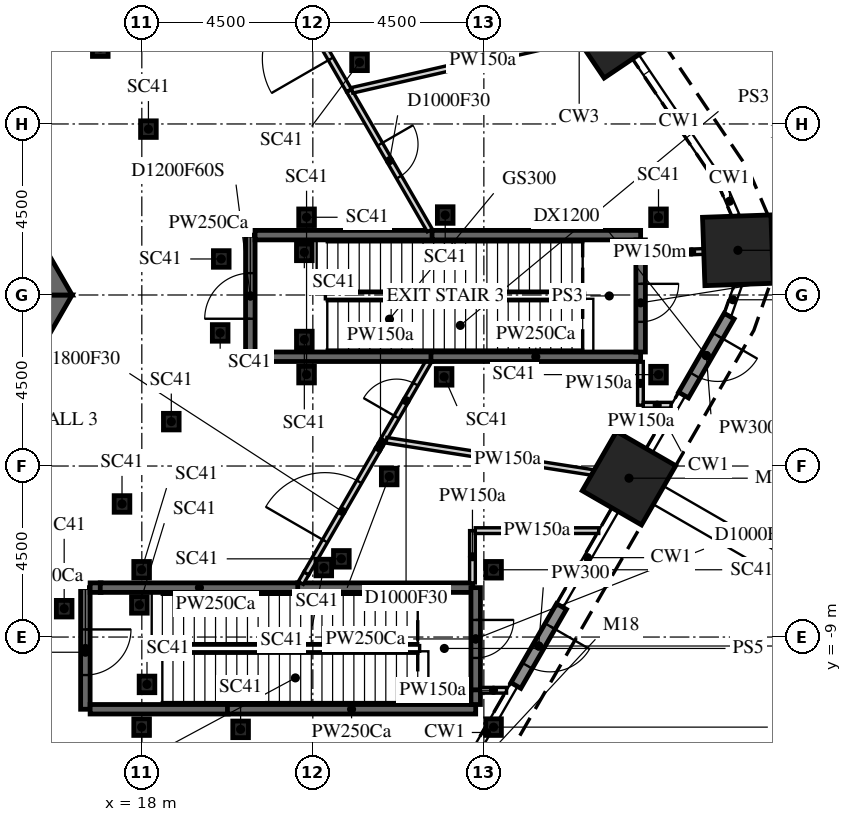
"""IFC4 building model, lengths in metres.
Left out: names, types, materials, properties, quantities, classifications, styles, units other than length and angle.
Written with IfcOpenShell. Run it as: python <this file> out.ifc"""

import sys

from ifc_helpers import new_model, si_unit, direction, frame, frame_2d, origin, origin_2d, place, context, subcontext, project, spatial, polyline, rectangle, i_section, outline, extrude, element, fill, save


model = new_model("IFC4")
c1 = context("Model", 3, precision=1e-05, world=origin(), true_north=direction((0.0, 1.0)))
c2 = subcontext(c1, "Body", "Model", "MODEL_VIEW")
j1 = project(units=[si_unit("LENGTHUNIT", "METRE"), si_unit("PLANEANGLEUNIT", "RADIAN")], contexts=[c1])
p1 = place(None, origin())
s1 = spatial("IfcSite", under=j1, at=p1, CompositionType="ELEMENT")
p2 = place(p1, origin())
s2 = spatial("IfcBuilding", under=s1, at=p2, CompositionType="ELEMENT")
p3 = place(p2, origin())
s3 = spatial("IfcBuildingStorey", under=s2, at=p3, CompositionType="ELEMENT", Elevation=0.0)
for number, where, z_axis, x_axis in (
    (1, (30.819, -4.82, -2.1), (0.0, 0.0, 1.0), (-0.5, -0.866, 0.0)),
    (2, (33.685, 1.176, -2.1), (0.0, 0.0, 1.0), (0.035, -0.999, 0.0)),
    (3, (30.407, 6.958, -2.1), (0.0, 0.0, 1.0), (0.559, -0.829, 0.0)),
):
    element("IfcColumn", number, at=place(p3, frame(where, z_axis=z_axis, x_axis=x_axis)), inside=s3, PredefinedType="COLUMN", context=c2, shape_type="SweptSolid", body=[
        extrude(rectangle(XDim=1.8, YDim=1.8, at=origin_2d()), origin(), (0.0, 0.0, 1.0), 10.85),
    ])
for number, where, z_axis, x_axis in (
    (4, (22.276, 1.121, -2.1), (0.0, 0.0, 1.0), (1.0, 0.0, 0.0)),
    (5, (20.091, 0.948, -2.1), (0.0, 0.0, 1.0), (1.0, 0.0, 0.0)),
    (6, (18.174, 4.364, -2.1), (0.0, 0.0, 1.0), (1.0, 0.0, 0.0)),
    (7, (23.728, 6.122, -2.1), (0.0, 0.0, 1.0), (1.0, 0.0, 0.0)),
    (8, (25.983, 2.104, -2.1), (0.0, 0.0, 1.0), (1.0, 0.0, 0.0)),
    (9, (31.595, 2.045, -2.1), (0.0, 0.0, 1.0), (1.0, 0.0, 0.0)),
    (10, (31.595, -2.095, -2.1), (0.0, 0.0, 1.0), (1.0, 0.0, 0.0)),
    (11, (25.954, -2.154, -2.1), (0.0, 0.0, 1.0), (1.0, 0.0, 0.0)),
    (12, (24.509, -4.776, -2.1), (0.0, 0.0, 1.0), (1.0, 0.0, 0.0)),
    (13, (18.776, -3.332, -2.1), (0.0, 0.0, 1.0), (1.0, 0.0, 0.0)),
    (14, (20.062, -0.998, -2.1), (0.0, 0.0, 1.0), (1.0, 0.0, 0.0)),
    (15, (22.276, -1.171, -2.1), (0.0, 0.0, 1.0), (1.0, 0.0, 0.0)),
    (16, (15.957, -8.254, -2.1), (0.0, 0.0, 1.0), (1.0, 0.0, 0.0)),
    (17, (17.479, -5.498, -2.1), (0.0, 0.0, 1.0), (1.0, 0.0, 0.0)),
    (18, (23.25, -6.942, -2.1), (0.0, 0.0, 1.0), (1.0, 0.0, 0.0)),
    (19, (22.788, -7.171, -2.1), (0.0, 0.0, 1.0), (1.0, 0.0, 0.0)),
    (20, (27.255, -7.23, -2.1), (0.0, 0.0, 1.0), (1.0, 0.0, 0.0)),
    (21, (27.255, -11.37, -2.1), (0.0, 0.0, 1.0), (1.0, 0.0, 0.0)),
    (22, (20.599, -11.429, -2.1), (0.0, 0.0, 1.0), (1.0, 0.0, 0.0)),
    (23, (18.136, -10.246, -2.1), (0.0, 0.0, 1.0), (1.0, 0.0, 0.0)),
    (24, (17.936, -8.154, -2.1), (0.0, 0.0, 1.0), (1.0, 0.0, 0.0)),
    (25, (16.907, 6.496, -2.1), (0.0, 0.0, 1.0), (1.0, 0.0, 0.0)),
    (26, (22.335, -2.095, -2.1), (0.0, 0.0, 1.0), (1.0, 0.0, 0.0)),
    (27, (22.335, 2.045, -2.1), (0.0, 0.0, 1.0), (1.0, 0.0, 0.0)),
    (28, (17.995, -11.37, -2.1), (0.0, 0.0, 1.0), (1.0, 0.0, 0.0)),
    (29, (17.995, -7.23, -2.1), (0.0, 0.0, 1.0), (1.0, 0.0, 0.0)),
):
    element("IfcColumn", number, at=place(p3, frame(where, z_axis=z_axis, x_axis=x_axis)), inside=s3, PredefinedType="COLUMN", context=c2, shape_type="SweptSolid", body=[
        extrude(i_section(OverallWidth=0.412, OverallDepth=0.437, WebThickness=0.036, FlangeThickness=0.058, FilletRadius=0.015, at=origin_2d()), origin(), (0.0, 0.0, 1.0), 10.85),
    ])
p4 = place(p3, frame((29.043, -8.197, 0.0), z_axis=(0.0, 0.0, 1.0), x_axis=(-0.500001309137, -0.866024647952, 0.0)))
e30 = element("IfcWall", 30, at=p4, inside=s3, PredefinedType="SOLIDWALL", context=c2, shape_type="SweptSolid", body=[
    extrude(rectangle(XDim=2.4, YDim=0.3, at=frame_2d((1.2, 0.0))), origin(), (0.0, 0.0, 1.0), 7.823),
])
p5 = place(p4, frame((0.6, 0.0, 0.0)))
e31 = element("IfcOpeningElement", 31, at=p5, cuts=e30, PredefinedType="OPENING", context=c2, shape_type="SweptSolid", body=[
    extrude(rectangle(XDim=1.2, YDim=2.1, at=frame_2d((0.6, 1.05))), frame((0.0, 0.16, 0.0), z_axis=(0.0, -1.0, 0.0), x_axis=(1.0, 0.0, 0.0)), (0.0, 0.0, 1.0), 0.32),
])
p6 = place(p3, frame((33.455, -0.555, 0.0), z_axis=(0.0, 0.0, 1.0), x_axis=(-0.499957262057, -0.866050077142, 0.0)))
e32 = element("IfcWall", 32, at=p6, inside=s3, PredefinedType="SOLIDWALL", context=c2, shape_type="SweptSolid", body=[
    extrude(rectangle(XDim=2.4, YDim=0.3, at=frame_2d((1.2, 0.0))), origin(), (0.0, 0.0, 1.0), 7.823),
])
p7 = place(p6, frame((0.6, 0.0, 0.0)))
e33 = element("IfcOpeningElement", 33, at=p7, cuts=e32, PredefinedType="OPENING", context=c2, shape_type="SweptSolid", body=[
    extrude(rectangle(XDim=1.2, YDim=2.1, at=frame_2d((0.6, 1.05))), frame((0.0, 0.16, 0.0), z_axis=(0.0, -1.0, 0.0), x_axis=(1.0, 0.0, 0.0)), (0.0, 0.0, 1.0), 0.32),
])
p8 = place(p3, frame((7.91, -13.7, -2.1), z_axis=(0.0, 0.0, 1.0), x_axis=(0.499999880136, 0.866025472988, 0.0)))
e34 = element("IfcWall", 34, at=p8, inside=s3, PredefinedType="SHEAR", context=c2, shape_type="SweptSolid", body=[
    extrude(outline(polyline([(-0.173, -0.3), (15.993, -0.3), (15.646, 0.3), (0.173, 0.3), (-0.173, -0.3)])), origin(), (0.0, 0.0, 1.0), 10.85),
])
p9 = place(p8, frame((7.039, 0.0, 2.1)))
e35 = element("IfcOpeningElement", 35, at=p9, cuts=e34, PredefinedType="OPENING", context=c2, shape_type="SweptSolid", body=[
    extrude(rectangle(XDim=1.8, YDim=2.4, at=frame_2d((0.9, 1.2))), frame((0.0, 0.31, 0.0), z_axis=(0.0, -1.0, 0.0), x_axis=(1.0, 0.0, 0.0)), (0.0, 0.0, 1.0), 0.62),
])
p10 = place(p3, frame((15.819, 0.0, -2.1), z_axis=(0.0, 0.0, 1.0), x_axis=(-0.499999880136, 0.866025472988, 0.0)))
e36 = element("IfcWall", 36, at=p10, inside=s3, PredefinedType="SHEAR", context=c2, shape_type="SweptSolid", body=[
    extrude(outline(polyline([(-0.173, -0.3), (15.993, -0.3), (15.646, 0.3), (0.173, 0.3), (-0.173, -0.3)])), origin(), (0.0, 0.0, 1.0), 10.85),
])
p11 = place(p10, frame((6.981, 0.0, 2.1)))
e37 = element("IfcOpeningElement", 37, at=p11, cuts=e36, PredefinedType="OPENING", context=c2, shape_type="SweptSolid", body=[
    extrude(rectangle(XDim=1.8, YDim=2.4, at=frame_2d((0.9, 1.2))), frame((0.0, 0.31, 0.0), z_axis=(0.0, -1.0, 0.0), x_axis=(1.0, 0.0, 0.0)), (0.0, 0.0, 1.0), 0.62),
])
p12 = place(p3, frame((16.515, -7.7, 0.0), z_axis=(0.0, 0.0, 1.0), x_axis=(0.0, -1.0, 0.0)))
e38 = element("IfcWall", 38, at=p12, inside=s3, PredefinedType="PARTITIONING", context=c2, shape_type="SweptSolid", body=[
    extrude(rectangle(XDim=3.2, YDim=0.25, at=frame_2d((1.6, 0.0))), origin(), (0.0, 0.0, 1.0), 8.75),
])
p13 = place(p12, frame((1.1, 0.0, 0.0)))
e39 = element("IfcOpeningElement", 39, at=p13, cuts=e38, PredefinedType="OPENING", context=c2, shape_type="SweptSolid", body=[
    extrude(rectangle(XDim=1.2, YDim=2.1, at=frame_2d((0.6, 1.05))), frame((0.0, 0.135, 0.0), z_axis=(0.0, -1.0, 0.0), x_axis=(1.0, 0.0, 0.0)), (0.0, 0.0, 1.0), 0.27),
])
p14 = place(p3, frame((16.64, -7.7, 0.0), z_axis=(0.0, 0.0, 1.0), x_axis=(1.0, 0.0, 0.0)))
e40 = element("IfcWall", 40, at=p14, inside=s3, PredefinedType="PARTITIONING", context=c2, shape_type="SweptSolid", body=[
    extrude(rectangle(XDim=0.288, YDim=0.25, at=frame_2d((0.144, 0.0))), origin(), (0.0, 0.0, 1.0), 8.75),
])
p15 = place(p3, frame((16.906, -7.7, 0.0), z_axis=(0.0, 0.0, 1.0), x_axis=(1.0, 0.0, 0.0)))
e41 = element("IfcWall", 41, at=p15, inside=s3, PredefinedType="PARTITIONING", context=c2, shape_type="SweptSolid", body=[
    extrude(rectangle(XDim=5.219, YDim=0.25, at=frame_2d((2.609, 0.0))), origin(), (0.0, 0.0, 1.0), 8.75),
])
p16 = place(p3, frame((20.275, -10.9, 0.0), z_axis=(0.0, 0.0, 1.0), x_axis=(-1.0, 0.0, 0.0)))
e42 = element("IfcWall", 42, at=p16, inside=s3, PredefinedType="PARTITIONING", context=c2, shape_type="SweptSolid", body=[
    extrude(rectangle(XDim=3.635, YDim=0.25, at=frame_2d((1.817, 0.0))), origin(), (0.0, 0.0, 1.0), 8.75),
])
p17 = place(p3, frame((20.855, -1.625, 0.0), z_axis=(0.0, 0.0, 1.0), x_axis=(0.0, 1.0, 0.0)))
e43 = element("IfcWall", 43, at=p17, inside=s3, PredefinedType="PARTITIONING", context=c2, shape_type="SweptSolid", body=[
    extrude(rectangle(XDim=3.2, YDim=0.25, at=frame_2d((1.6, 0.0))), origin(), (0.0, 0.0, 1.0), 8.75),
])
p18 = place(p17, frame((1.0, 0.0, 0.0)))
e44 = element("IfcOpeningElement", 44, at=p18, cuts=e43, PredefinedType="OPENING", context=c2, shape_type="SweptSolid", body=[
    extrude(rectangle(XDim=1.2, YDim=2.1, at=frame_2d((0.6, 1.05))), frame((0.0, 0.135, 0.0), z_axis=(0.0, -1.0, 0.0), x_axis=(1.0, 0.0, 0.0)), (0.0, 0.0, 1.0), 0.27),
])
p19 = place(p3, frame((20.98, 1.575, 0.0), z_axis=(0.0, 0.0, 1.0), x_axis=(1.0, 0.0, 0.0)))
e45 = element("IfcWall", 45, at=p19, inside=s3, PredefinedType="PARTITIONING", context=c2, shape_type="SweptSolid", body=[
    extrude(rectangle(XDim=4.679, YDim=0.25, at=frame_2d((2.339, 0.0))), origin(), (0.0, 0.0, 1.0), 8.75),
])
p20 = place(p3, frame((22.102, -7.7, 0.0), z_axis=(0.0, 0.0, 1.0), x_axis=(1.0, 0.0, 0.0)))
e46 = element("IfcWall", 46, at=p20, inside=s3, PredefinedType="PARTITIONING", context=c2, shape_type="SweptSolid", body=[
    extrude(rectangle(XDim=4.608, YDim=0.25, at=frame_2d((2.304, 0.0))), origin(), (0.0, 0.0, 1.0), 8.75),
])
p21 = place(p3, frame((22.184, -7.575, 0.0), z_axis=(0.0, 0.0, 1.0), x_axis=(0.500158362642, 0.865933953763, 0.0)))
e47 = element("IfcWall", 47, at=p21, inside=s3, PredefinedType="PARTITIONING", context=c2, shape_type="SweptSolid", body=[
    extrude(rectangle(XDim=0.307, YDim=0.15, at=frame_2d((0.154, 0.0))), origin(), (0.0, 0.0, 1.0), 8.75),
])
p22 = place(p3, frame((22.328, -7.326, 0.0), z_axis=(0.0, 0.0, 1.0), x_axis=(0.499922466183, 0.866070163327, 0.0)))
e48 = element("IfcWall", 48, at=p22, inside=s3, PredefinedType="PARTITIONING", context=c2, shape_type="SweptSolid", body=[
    extrude(rectangle(XDim=3.769, YDim=0.15, at=frame_2d((1.884, 0.0))), origin(), (0.0, 0.0, 1.0), 8.75),
])
p23 = place(p22, frame((0.984, 0.0, 0.0)))
e49 = element("IfcOpeningElement", 49, at=p23, cuts=e48, PredefinedType="OPENING", context=c2, shape_type="SweptSolid", body=[
    extrude(rectangle(XDim=1.8, YDim=2.1, at=frame_2d((0.9, 1.05))), frame((0.0, 0.085, 0.0), z_axis=(0.0, -1.0, 0.0), x_axis=(1.0, 0.0, 0.0)), (0.0, 0.0, 1.0), 0.17),
])
p24 = place(p3, frame((23.449, 5.386, 0.0), z_axis=(0.0, 0.0, 1.0), x_axis=(-0.500058396869, 0.865991685711, 0.0)))
e50 = element("IfcWall", 50, at=p24, inside=s3, PredefinedType="PARTITIONING", context=c2, shape_type="SweptSolid", body=[
    extrude(rectangle(XDim=3.711, YDim=0.15, at=frame_2d((1.856, 0.0))), origin(), (0.0, 0.0, 1.0), 8.75),
])
p25 = place(p24, frame((0.956, 0.0, 0.0)))
e51 = element("IfcOpeningElement", 51, at=p25, cuts=e50, PredefinedType="OPENING", context=c2, shape_type="SweptSolid", body=[
    extrude(rectangle(XDim=1.8, YDim=2.1, at=frame_2d((0.9, 1.05))), frame((0.0, 0.085, 0.0), z_axis=(0.0, -1.0, 0.0), x_axis=(1.0, 0.0, 0.0)), (0.0, 0.0, 1.0), 0.17),
])
p26 = place(p3, frame((24.202, -4.079, 0.0), z_axis=(0.0, 0.0, 1.0), x_axis=(0.501624101268, 0.865085695771, 0.0)))
e52 = element("IfcWall", 52, at=p26, inside=s3, PredefinedType="PARTITIONING", context=c2, shape_type="SweptSolid", body=[
    extrude(rectangle(XDim=0.311, YDim=0.15, at=frame_2d((0.156, 0.0))), origin(), (0.0, 0.0, 1.0), 8.75),
])
p27 = place(p3, frame((24.358, -3.81, 0.0), z_axis=(0.0, 0.0, 1.0), x_axis=(0.500178430292, 0.865922362496, 0.0)))
e53 = element("IfcWall", 53, at=p27, inside=s3, PredefinedType="PARTITIONING", context=c2, shape_type="SweptSolid", body=[
    extrude(rectangle(XDim=2.379, YDim=0.15, at=frame_2d((1.189, 0.0))), origin(), (0.0, 0.0, 1.0), 8.75),
])
p28 = place(p27, frame((0.689, 0.0, 0.0)))
e54 = element("IfcOpeningElement", 54, at=p28, cuts=e53, PredefinedType="OPENING", context=c2, shape_type="SweptSolid", body=[
    extrude(rectangle(XDim=1.0, YDim=2.1, at=frame_2d((0.5, 1.05))), frame((0.0, 0.085, 0.0), z_axis=(0.0, -1.0, 0.0), x_axis=(1.0, 0.0, 0.0)), (0.0, 0.0, 1.0), 0.17),
])
p29 = place(p3, frame((25.63, -1.625, 0.0), z_axis=(0.0, 0.0, 1.0), x_axis=(-1.0, 0.0, 0.0)))
e55 = element("IfcWall", 55, at=p29, inside=s3, PredefinedType="PARTITIONING", context=c2, shape_type="SweptSolid", body=[
    extrude(rectangle(XDim=4.65, YDim=0.25, at=frame_2d((2.325, 0.0))), origin(), (0.0, 0.0, 1.0), 8.75),
])
p30 = place(p3, frame((25.637, 1.575, 0.0), z_axis=(0.0, 0.0, 1.0), x_axis=(1.0, 0.0, 0.0)))
e56 = element("IfcWall", 56, at=p30, inside=s3, PredefinedType="PARTITIONING", context=c2, shape_type="SweptSolid", body=[
    extrude(rectangle(XDim=5.488, YDim=0.25, at=frame_2d((2.744, 0.0))), origin(), (0.0, 0.0, 1.0), 8.75),
])
p31 = place(p3, frame((23.459, 5.368, 0.0), z_axis=(0.0, 0.0, 1.0), x_axis=(0.500038455881, -0.866003200133, 0.0)))
e57 = element("IfcWall", 57, at=p31, inside=s3, PredefinedType="PARTITIONING", context=c2, shape_type="SweptSolid", body=[
    extrude(rectangle(XDim=4.236, YDim=0.15, at=frame_2d((2.118, 0.0))), origin(), (0.0, 0.0, 1.0), 8.75),
])
p32 = place(p31, frame((1.618, 0.0, 0.0)))
e58 = element("IfcOpeningElement", 58, at=p32, cuts=e57, PredefinedType="OPENING", context=c2, shape_type="SweptSolid", body=[
    extrude(rectangle(XDim=1.0, YDim=2.1, at=frame_2d((0.5, 1.05))), frame((0.0, 0.085, 0.0), z_axis=(0.0, -1.0, 0.0), x_axis=(1.0, 0.0, 0.0)), (0.0, 0.0, 1.0), 0.17),
])
p33 = place(p3, frame((26.7, -7.575, 0.0), z_axis=(0.0, 0.0, 1.0), x_axis=(0.0, 1.0, 0.0)))
e59 = element("IfcWall", 59, at=p33, inside=s3, PredefinedType="PARTITIONING", context=c2, shape_type="SweptSolid", body=[
    extrude(rectangle(XDim=1.375, YDim=0.15, at=frame_2d((0.688, 0.0))), origin(), (0.0, 0.0, 1.0), 8.75),
])
p34 = place(p3, frame((26.775, -6.2, 0.0), z_axis=(0.0, 0.0, 1.0), x_axis=(1.0, 0.0, 0.0)))
e60 = element("IfcWall", 60, at=p34, inside=s3, PredefinedType="PARTITIONING", context=c2, shape_type="SweptSolid", body=[
    extrude(rectangle(XDim=3.247, YDim=0.15, at=frame_2d((1.624, 0.0))), origin(), (0.0, 0.0, 1.0), 8.75),
])
p35 = place(p3, frame((26.785, -10.9, 0.0), z_axis=(0.0, 0.0, 1.0), x_axis=(-1.0, 0.0, 0.0)))
e61 = element("IfcWall", 61, at=p35, inside=s3, PredefinedType="PARTITIONING", context=c2, shape_type="SweptSolid", body=[
    extrude(rectangle(XDim=6.532, YDim=0.25, at=frame_2d((3.266, 0.0))), origin(), (0.0, 0.0, 1.0), 8.75),
])
p36 = place(p3, frame((26.785, -7.7, 0.0), z_axis=(0.0, 0.0, 1.0), x_axis=(0.0, -1.0, 0.0)))
e62 = element("IfcWall", 62, at=p36, inside=s3, PredefinedType="PARTITIONING", context=c2, shape_type="SweptSolid", body=[
    extrude(rectangle(XDim=2.7, YDim=0.25, at=frame_2d((1.35, 0.0))), origin(), (0.0, 0.0, 1.0), 8.75),
])
p37 = place(p36, frame((0.85, 0.0, 0.0)))
e63 = element("IfcOpeningElement", 63, at=p37, cuts=e62, PredefinedType="OPENING", context=c2, shape_type="SweptSolid", body=[
    extrude(rectangle(XDim=1.0, YDim=2.1, at=frame_2d((0.5, 1.05))), frame((0.0, 0.135, 0.0), z_axis=(0.0, -1.0, 0.0), x_axis=(1.0, 0.0, 0.0)), (0.0, 0.0, 1.0), 0.27),
])
p38 = place(p3, frame((26.785, -10.39, 0.0), z_axis=(0.0, 0.0, 1.0), x_axis=(0.0, -1.0, 0.0)))
e64 = element("IfcWall", 64, at=p38, inside=s3, PredefinedType="PARTITIONING", context=c2, shape_type="SweptSolid", body=[
    extrude(rectangle(XDim=0.385, YDim=0.25, at=frame_2d((0.192, 0.0))), origin(), (0.0, 0.0, 1.0), 8.75),
])
p39 = place(p3, frame((27.597, -10.4, 0.0), z_axis=(0.0, 0.0, 1.0), x_axis=(-1.0, 0.0, 0.0)))
e65 = element("IfcWall", 65, at=p39, inside=s3, PredefinedType="PARTITIONING", context=c2, shape_type="SweptSolid", body=[
    extrude(rectangle(XDim=0.687, YDim=0.15, at=frame_2d((0.344, 0.0))), origin(), (0.0, 0.0, 1.0), 8.75),
])
p40 = place(p3, frame((30.407, 6.958, 0.0), z_axis=(0.0, 0.0, 1.0), x_axis=(-0.974801082726, -0.223075881967, 0.0)))
e66 = element("IfcWall", 66, at=p40, inside=s3, PredefinedType="PARTITIONING", context=c2, shape_type="SweptSolid", body=[
    extrude(rectangle(XDim=7.049, YDim=0.15, at=frame_2d((3.525, 0.0))), origin(), (0.0, 0.0, 1.0), 8.75),
])
p41 = place(p3, frame((30.819, -4.82, 0.0), z_axis=(0.0, 0.0, 1.0), x_axis=(-0.988001762329, 0.154442603041, 0.0)))
e67 = element("IfcWall", 67, at=p41, inside=s3, PredefinedType="PARTITIONING", context=c2, shape_type="SweptSolid", body=[
    extrude(rectangle(XDim=6.459, YDim=0.15, at=frame_2d((3.229, 0.0))), origin(), (0.0, 0.0, 1.0), 8.75),
])
p42 = place(p3, frame((31.12, -2.9, 0.0), z_axis=(0.0, 0.0, 1.0), x_axis=(0.0, 1.0, 0.0)))
e68 = element("IfcWall", 68, at=p42, inside=s3, PredefinedType="PARTITIONING", context=c2, shape_type="SweptSolid", body=[
    extrude(rectangle(XDim=1.15, YDim=0.15, at=frame_2d((0.575, 0.0))), origin(), (0.0, 0.0, 1.0), 8.75),
])
p43 = place(p3, frame((31.125, -1.625, 0.0), z_axis=(0.0, 0.0, 1.0), x_axis=(-1.0, 0.0, 0.0)))
e69 = element("IfcWall", 69, at=p43, inside=s3, PredefinedType="PARTITIONING", context=c2, shape_type="SweptSolid", body=[
    extrude(rectangle(XDim=5.517, YDim=0.25, at=frame_2d((2.759, 0.0))), origin(), (0.0, 0.0, 1.0), 8.75),
])
p44 = place(p3, frame((31.125, 1.087, 0.0), z_axis=(0.0, 0.0, 1.0), x_axis=(0.0, -1.0, 0.0)))
e70 = element("IfcWall", 70, at=p44, inside=s3, PredefinedType="PARTITIONING", context=c2, shape_type="SweptSolid", body=[
    extrude(rectangle(XDim=2.587, YDim=0.25, at=frame_2d((1.293, 0.0))), origin(), (0.0, 0.0, 1.0), 8.75),
])
p45 = place(p44, frame((0.793, 0.0, 0.0)))
e71 = element("IfcOpeningElement", 71, at=p45, cuts=e70, PredefinedType="OPENING", context=c2, shape_type="SweptSolid", body=[
    extrude(rectangle(XDim=1.0, YDim=2.1, at=frame_2d((0.5, 1.05))), frame((0.0, 0.135, 0.0), z_axis=(0.0, -1.0, 0.0), x_axis=(1.0, 0.0, 0.0)), (0.0, 0.0, 1.0), 0.27),
])
p46 = place(p3, frame((31.25, 1.091, 0.0), z_axis=(0.0, 0.0, 1.0), x_axis=(0.999395360939, 0.034769419515, 0.0)))
e72 = element("IfcWall", 72, at=p46, inside=s3, PredefinedType="PARTITIONING", context=c2, shape_type="SweptSolid", body=[
    extrude(rectangle(XDim=2.437, YDim=0.15, at=frame_2d((1.218, 0.0))), origin(), (0.0, 0.0, 1.0), 8.297),
])
p47 = place(p3, frame((31.125, 1.45, 0.0), z_axis=(0.0, 0.0, 1.0), x_axis=(0.0, -1.0, 0.0)))
e73 = element("IfcWall", 73, at=p47, inside=s3, PredefinedType="PARTITIONING", context=c2, shape_type="SweptSolid", body=[
    extrude(rectangle(XDim=0.373, YDim=0.25, at=frame_2d((0.187, 0.0))), origin(), (0.0, 0.0, 1.0), 8.75),
])
p48 = place(p3, frame((31.927, -2.9, 0.0), z_axis=(0.0, 0.0, 1.0), x_axis=(-1.0, 0.0, 0.0)))
e74 = element("IfcWall", 74, at=p48, inside=s3, PredefinedType="PARTITIONING", context=c2, shape_type="SweptSolid", body=[
    extrude(rectangle(XDim=0.732, YDim=0.15, at=frame_2d((0.366, 0.0))), origin(), (0.0, 0.0, 1.0), 8.75),
])
p49 = place(p5, frame((0.0, -0.025, 0.0)))
e75 = element("IfcDoor", 75, at=p49, inside=s3, OperationType="SINGLE_SWING_LEFT", PredefinedType="DOOR", context=c2, shape_type="SweptSolid", body=[
    extrude(rectangle(XDim=1.2, YDim=2.1, at=frame_2d((0.6, 1.05))), frame((0.0, 0.025, 0.0), z_axis=(0.0, -1.0, 0.0), x_axis=(1.0, 0.0, 0.0)), (0.0, 0.0, 1.0), 0.05),
])
fill(e31, e75)
p50 = place(p7, frame((0.0, -0.025, 0.0)))
e76 = element("IfcDoor", 76, at=p50, inside=s3, OperationType="SINGLE_SWING_LEFT", PredefinedType="DOOR", context=c2, shape_type="SweptSolid", body=[
    extrude(rectangle(XDim=1.2, YDim=2.1, at=frame_2d((0.6, 1.05))), frame((0.0, 0.025, 0.0), z_axis=(0.0, -1.0, 0.0), x_axis=(1.0, 0.0, 0.0)), (0.0, 0.0, 1.0), 0.05),
])
fill(e33, e76)
p51 = place(p13, origin())
e77 = element("IfcDoor", 77, at=p51, inside=s3, OperationType="SINGLE_SWING_LEFT", PredefinedType="DOOR", context=c2, shape_type="SweptSolid", body=[
    extrude(rectangle(XDim=1.2, YDim=2.1, at=frame_2d((0.6, 1.05))), frame((0.0, 0.025, 0.0), z_axis=(0.0, -1.0, 0.0), x_axis=(1.0, 0.0, 0.0)), (0.0, 0.0, 1.0), 0.05),
])
fill(e39, e77)
p52 = place(p18, origin())
e78 = element("IfcDoor", 78, at=p52, inside=s3, OperationType="SINGLE_SWING_LEFT", PredefinedType="DOOR", context=c2, shape_type="SweptSolid", body=[
    extrude(rectangle(XDim=1.2, YDim=2.1, at=frame_2d((0.6, 1.05))), frame((0.0, 0.025, 0.0), z_axis=(0.0, -1.0, 0.0), x_axis=(1.0, 0.0, 0.0)), (0.0, 0.0, 1.0), 0.05),
])
fill(e44, e78)
p53 = place(p23, origin())
e79 = element("IfcDoor", 79, at=p53, inside=s3, OperationType="DOUBLE_DOOR_SINGLE_SWING", PredefinedType="DOOR", context=c2, shape_type="SweptSolid", body=[
    extrude(rectangle(XDim=1.8, YDim=2.1, at=frame_2d((0.9, 1.05))), frame((0.0, 0.025, 0.0), z_axis=(0.0, -1.0, 0.0), x_axis=(1.0, 0.0, 0.0)), (0.0, 0.0, 1.0), 0.05),
])
fill(e49, e79)
p54 = place(p25, origin())
e80 = element("IfcDoor", 80, at=p54, inside=s3, OperationType="DOUBLE_DOOR_SINGLE_SWING", PredefinedType="DOOR", context=c2, shape_type="SweptSolid", body=[
    extrude(rectangle(XDim=1.8, YDim=2.1, at=frame_2d((0.9, 1.05))), frame((0.0, 0.025, 0.0), z_axis=(0.0, -1.0, 0.0), x_axis=(1.0, 0.0, 0.0)), (0.0, 0.0, 1.0), 0.05),
])
fill(e51, e80)
p55 = place(p28, origin())
e81 = element("IfcDoor", 81, at=p55, inside=s3, OperationType="SINGLE_SWING_LEFT", PredefinedType="DOOR", context=c2, shape_type="SweptSolid", body=[
    extrude(rectangle(XDim=1.0, YDim=2.1, at=frame_2d((0.5, 1.05))), frame((0.0, 0.025, 0.0), z_axis=(0.0, -1.0, 0.0), x_axis=(1.0, 0.0, 0.0)), (0.0, 0.0, 1.0), 0.05),
])
fill(e54, e81)
p56 = place(p32, origin())
e82 = element("IfcDoor", 82, at=p56, inside=s3, OperationType="SINGLE_SWING_RIGHT", PredefinedType="DOOR", context=c2, shape_type="SweptSolid", body=[
    extrude(rectangle(XDim=1.0, YDim=2.1, at=frame_2d((0.5, 1.05))), frame((0.0, 0.025, 0.0), z_axis=(0.0, -1.0, 0.0), x_axis=(1.0, 0.0, 0.0)), (0.0, 0.0, 1.0), 0.05),
])
fill(e58, e82)
p57 = place(p37, origin())
e83 = element("IfcDoor", 83, at=p57, inside=s3, OperationType="SINGLE_SWING_LEFT", PredefinedType="DOOR", context=c2, shape_type="SweptSolid", body=[
    extrude(rectangle(XDim=1.0, YDim=2.1, at=frame_2d((0.5, 1.05))), frame((0.0, 0.025, 0.0), z_axis=(0.0, -1.0, 0.0), x_axis=(1.0, 0.0, 0.0)), (0.0, 0.0, 1.0), 0.05),
])
fill(e63, e83)
p58 = place(p45, origin())
e84 = element("IfcDoor", 84, at=p58, inside=s3, OperationType="SINGLE_SWING_RIGHT", PredefinedType="DOOR", context=c2, shape_type="SweptSolid", body=[
    extrude(rectangle(XDim=1.0, YDim=2.1, at=frame_2d((0.5, 1.05))), frame((0.0, 0.025, 0.0), z_axis=(0.0, -1.0, 0.0), x_axis=(1.0, 0.0, 0.0)), (0.0, 0.0, 1.0), 0.05),
])
fill(e71, e84)
save(model, sys.argv[1])
